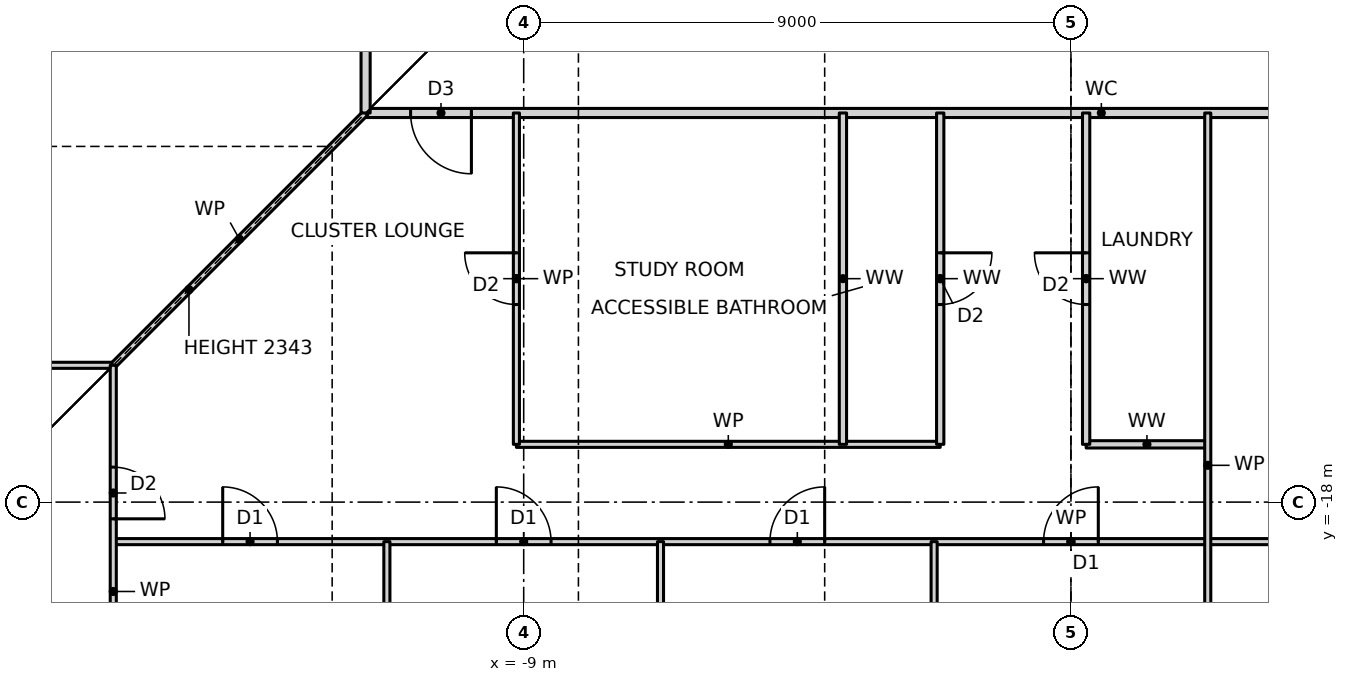
"""IFC4 building model, lengths in metres.
Left out: names, types, materials, properties, quantities, classifications, styles, units other than length and angle.
Written with IfcOpenShell. Run it as: python <this file> out.ifc"""

import sys

from ifc_helpers import new_model, si_unit, direction, frame, frame_2d, origin, place, context, subcontext, project, spatial, rectangle, extrude, element, fill, save


model = new_model("IFC4")
c1 = context("Model", 3, precision=1e-05, world=origin(), true_north=direction((0.0, 1.0)))
c2 = subcontext(c1, "Body", "Model", "MODEL_VIEW")
j1 = project(units=[si_unit("LENGTHUNIT", "METRE"), si_unit("PLANEANGLEUNIT", "RADIAN")], contexts=[c1])
p1 = place(None, origin())
s1 = spatial("IfcSite", under=j1, at=p1, CompositionType="ELEMENT")
p2 = place(p1, origin())
s2 = spatial("IfcBuilding", under=s1, at=p2, CompositionType="ELEMENT")
p3 = place(p2, frame((0.0, 0.0, 67.5)))
s3 = spatial("IfcBuildingStorey", under=s2, at=p3, CompositionType="ELEMENT", Elevation=67.5)
p4 = place(p3, frame((-15.75, -18.65, 0.0), z_axis=(0.0, 0.0, 1.0), x_axis=(1.0, 0.0, 0.0)))
e1 = element("IfcWall", 1, at=p4, inside=s3, PredefinedType="PARTITIONING", context=c2, shape_type="SweptSolid", body=[
    extrude(rectangle(XDim=31.5, YDim=0.1, at=frame_2d((15.75, 0.0))), origin(), (0.0, 0.0, 1.0), 3.27),
])
p5 = place(p4, frame((1.8, 0.0, 0.0)))
e2 = element("IfcOpeningElement", 2, at=p5, cuts=e1, PredefinedType="OPENING", context=c2, shape_type="SweptSolid", body=[
    extrude(rectangle(XDim=0.9, YDim=2.1, at=frame_2d((0.45, 1.05))), frame((0.0, 0.06, 0.0), z_axis=(0.0, -1.0, 0.0), x_axis=(1.0, 0.0, 0.0)), (0.0, 0.0, 1.0), 0.12),
])
p6 = place(p4, frame((6.3, 0.0, 0.0)))
e3 = element("IfcOpeningElement", 3, at=p6, cuts=e1, PredefinedType="OPENING", context=c2, shape_type="SweptSolid", body=[
    extrude(rectangle(XDim=0.9, YDim=2.1, at=frame_2d((0.45, 1.05))), frame((0.0, 0.06, 0.0), z_axis=(0.0, -1.0, 0.0), x_axis=(1.0, 0.0, 0.0)), (0.0, 0.0, 1.0), 0.12),
])
p7 = place(p4, frame((10.8, 0.0, 0.0)))
e4 = element("IfcOpeningElement", 4, at=p7, cuts=e1, PredefinedType="OPENING", context=c2, shape_type="SweptSolid", body=[
    extrude(rectangle(XDim=0.9, YDim=2.1, at=frame_2d((0.45, 1.05))), frame((0.0, 0.06, 0.0), z_axis=(0.0, -1.0, 0.0), x_axis=(1.0, 0.0, 0.0)), (0.0, 0.0, 1.0), 0.12),
])
p8 = place(p4, frame((15.3, 0.0, 0.0)))
e5 = element("IfcOpeningElement", 5, at=p8, cuts=e1, PredefinedType="OPENING", context=c2, shape_type="SweptSolid", body=[
    extrude(rectangle(XDim=0.9, YDim=2.1, at=frame_2d((0.45, 1.05))), frame((0.0, 0.06, 0.0), z_axis=(0.0, -1.0, 0.0), x_axis=(1.0, 0.0, 0.0)), (0.0, 0.0, 1.0), 0.12),
])
p9 = place(p4, frame((19.8, 0.0, 0.0)))
e6 = element("IfcOpeningElement", 6, at=p9, cuts=e1, PredefinedType="OPENING", context=c2, shape_type="SweptSolid", body=[
    extrude(rectangle(XDim=0.9, YDim=2.1, at=frame_2d((0.45, 1.05))), frame((0.0, 0.06, 0.0), z_axis=(0.0, -1.0, 0.0), x_axis=(1.0, 0.0, 0.0)), (0.0, 0.0, 1.0), 0.12),
])
p10 = place(p4, frame((24.3, 0.0, 0.0)))
e7 = element("IfcOpeningElement", 7, at=p10, cuts=e1, PredefinedType="OPENING", context=c2, shape_type="SweptSolid", body=[
    extrude(rectangle(XDim=0.9, YDim=2.1, at=frame_2d((0.45, 1.05))), frame((0.0, 0.06, 0.0), z_axis=(0.0, -1.0, 0.0), x_axis=(1.0, 0.0, 0.0)), (0.0, 0.0, 1.0), 0.12),
])
p11 = place(p4, frame((28.8, 0.0, 0.0)))
e8 = element("IfcOpeningElement", 8, at=p11, cuts=e1, PredefinedType="OPENING", context=c2, shape_type="SweptSolid", body=[
    extrude(rectangle(XDim=0.9, YDim=2.1, at=frame_2d((0.45, 1.05))), frame((0.0, 0.06, 0.0), z_axis=(0.0, -1.0, 0.0), x_axis=(1.0, 0.0, 0.0)), (0.0, 0.0, 1.0), 0.12),
])
p12 = place(p3, frame((-9.12, -17.05, 0.0), z_axis=(0.0, 0.0, 1.0), x_axis=(1.0, 0.0, 0.0)))
e9 = element("IfcWall", 9, at=p12, inside=s3, PredefinedType="PARTITIONING", context=c2, shape_type="SweptSolid", body=[
    extrude(rectangle(XDim=6.97, YDim=0.1, at=frame_2d((3.485, 0.0))), origin(), (0.0, 0.0, 1.0), 3.27),
])
p13 = place(p3, frame((0.25, -17.05, 0.0), z_axis=(0.0, 0.0, 1.0), x_axis=(1.0, 0.0, 0.0)))
e10 = element("IfcWall", 10, at=p13, inside=s3, PredefinedType="PARTITIONING", context=c2, shape_type="SweptSolid", body=[
    extrude(rectangle(XDim=2.0, YDim=0.12, at=frame_2d((1.0, 0.0))), origin(), (0.0, 0.0, 1.0), 3.27),
])
p14 = place(p3, frame((-23.19, -15.75, 0.0), z_axis=(0.0, 0.0, 1.0), x_axis=(1.0, 0.0, 0.0)))
e11 = element("IfcWall", 11, at=p14, inside=s3, PredefinedType="PARTITIONING", context=c2, shape_type="SweptSolid", body=[
    extrude(rectangle(XDim=7.44, YDim=0.1, at=frame_2d((3.72, 0.0))), origin(), (0.0, 0.0, 1.0), 3.27),
])
p15 = place(p3, frame((-11.6, -11.6, 0.0), z_axis=(0.0, 0.0, 1.0), x_axis=(1.0, 0.0, 0.0)))
e12 = element("IfcWall", 12, at=p15, inside=s3, PredefinedType="PARTITIONING", context=c2, shape_type="SweptSolid", body=[
    extrude(rectangle(XDim=24.2, YDim=0.15, at=frame_2d((12.1, 0.0))), origin(), (0.0, 0.0, 1.0), 3.27),
])
p16 = place(p15, frame((0.74, 0.0, 0.0)))
e13 = element("IfcOpeningElement", 13, at=p16, cuts=e12, PredefinedType="OPENING", context=c2, shape_type="SweptSolid", body=[
    extrude(rectangle(XDim=1.0, YDim=2.1, at=frame_2d((0.5, 1.05))), frame((0.0, 0.085, 0.0), z_axis=(0.0, -1.0, 0.0), x_axis=(1.0, 0.0, 0.0)), (0.0, 0.0, 1.0), 0.17),
])
p17 = place(p15, frame((21.025, 0.0, 0.0)))
e14 = element("IfcOpeningElement", 14, at=p17, cuts=e12, PredefinedType="OPENING", context=c2, shape_type="SweptSolid", body=[
    extrude(rectangle(XDim=1.0, YDim=2.1, at=frame_2d((0.5, 1.05))), frame((0.0, 0.085, 0.0), z_axis=(0.0, -1.0, 0.0), x_axis=(1.0, 0.0, 0.0)), (0.0, 0.0, 1.0), 0.17),
])
p18 = place(p3, frame((-15.75, -15.75, 0.0), z_axis=(0.0, 0.0, 1.0), x_axis=(0.707106781187, 0.707106781187, 0.0)))
e15 = element("IfcWall", 15, at=p18, inside=s3, PredefinedType="PARTITIONING", context=c2, shape_type="SweptSolid", body=[
    extrude(rectangle(XDim=5.869, YDim=0.1, at=frame_2d((2.935, 0.0))), origin(), (0.0, 0.0, 1.0), 2.343),
])
p19 = place(p3, frame((2.25, -23.19, 0.0), z_axis=(0.0, 0.0, 1.0), x_axis=(0.0, 1.0, 0.0)))
e16 = element("IfcWall", 16, at=p19, inside=s3, PredefinedType="PARTITIONING", context=c2, shape_type="SweptSolid", body=[
    extrude(rectangle(XDim=11.59, YDim=0.1, at=frame_2d((5.795, 0.0))), origin(), (0.0, 0.0, 1.0), 3.27),
])
p20 = place(p3, frame((0.25, -17.05, 0.0), z_axis=(0.0, 0.0, 1.0), x_axis=(0.0, 1.0, 0.0)))
e17 = element("IfcWall", 17, at=p20, inside=s3, PredefinedType="PARTITIONING", context=c2, shape_type="SweptSolid", body=[
    extrude(rectangle(XDim=5.45, YDim=0.12, at=frame_2d((2.725, 0.0))), origin(), (0.0, 0.0, 1.0), 3.27),
])
p21 = place(p20, frame((2.3, 0.0, 0.0)))
e18 = element("IfcOpeningElement", 18, at=p21, cuts=e17, PredefinedType="OPENING", context=c2, shape_type="SweptSolid", body=[
    extrude(rectangle(XDim=0.85, YDim=2.1, at=frame_2d((0.425, 1.05))), frame((0.0, 0.07, 0.0), z_axis=(0.0, -1.0, 0.0), x_axis=(1.0, 0.0, 0.0)), (0.0, 0.0, 1.0), 0.14),
])
p22 = place(p3, frame((-2.15, -17.05, 0.0), z_axis=(0.0, 0.0, 1.0), x_axis=(0.0, 1.0, 0.0)))
e19 = element("IfcWall", 19, at=p22, inside=s3, PredefinedType="PARTITIONING", context=c2, shape_type="SweptSolid", body=[
    extrude(rectangle(XDim=5.45, YDim=0.12, at=frame_2d((2.725, 0.0))), origin(), (0.0, 0.0, 1.0), 3.27),
])
p23 = place(p22, frame((2.3, 0.0, 0.0)))
e20 = element("IfcOpeningElement", 20, at=p23, cuts=e19, PredefinedType="OPENING", context=c2, shape_type="SweptSolid", body=[
    extrude(rectangle(XDim=0.85, YDim=2.1, at=frame_2d((0.425, 1.05))), frame((0.0, 0.07, 0.0), z_axis=(0.0, -1.0, 0.0), x_axis=(1.0, 0.0, 0.0)), (0.0, 0.0, 1.0), 0.14),
])
p24 = place(p3, frame((-2.25, -23.19, 0.0), z_axis=(0.0, 0.0, 1.0), x_axis=(0.0, 1.0, 0.0)))
e21 = element("IfcWall", 21, at=p24, inside=s3, PredefinedType="PARTITIONING", context=c2, shape_type="SweptSolid", body=[
    extrude(rectangle(XDim=4.54, YDim=0.1, at=frame_2d((2.27, 0.0))), origin(), (0.0, 0.0, 1.0), 3.27),
])
p25 = place(p3, frame((-3.75, -17.05, 0.0), z_axis=(0.0, 0.0, 1.0), x_axis=(0.0, 1.0, 0.0)))
e22 = element("IfcWall", 22, at=p25, inside=s3, PredefinedType="PARTITIONING", context=c2, shape_type="SweptSolid", body=[
    extrude(rectangle(XDim=5.45, YDim=0.12, at=frame_2d((2.725, 0.0))), origin(), (0.0, 0.0, 1.0), 3.27),
])
p26 = place(p3, frame((-6.75, -23.19, 0.0), z_axis=(0.0, 0.0, 1.0), x_axis=(0.0, 1.0, 0.0)))
e23 = element("IfcWall", 23, at=p26, inside=s3, PredefinedType="PARTITIONING", context=c2, shape_type="SweptSolid", body=[
    extrude(rectangle(XDim=4.54, YDim=0.1, at=frame_2d((2.27, 0.0))), origin(), (0.0, 0.0, 1.0), 3.27),
])
p27 = place(p3, frame((-9.12, -17.05, 0.0), z_axis=(0.0, 0.0, 1.0), x_axis=(0.0, 1.0, 0.0)))
e24 = element("IfcWall", 24, at=p27, inside=s3, PredefinedType="PARTITIONING", context=c2, shape_type="SweptSolid", body=[
    extrude(rectangle(XDim=5.45, YDim=0.1, at=frame_2d((2.725, 0.0))), origin(), (0.0, 0.0, 1.0), 3.27),
])
p28 = place(p27, frame((2.3, 0.0, 0.0)))
e25 = element("IfcOpeningElement", 25, at=p28, cuts=e24, PredefinedType="OPENING", context=c2, shape_type="SweptSolid", body=[
    extrude(rectangle(XDim=0.85, YDim=2.1, at=frame_2d((0.425, 1.05))), frame((0.0, 0.06, 0.0), z_axis=(0.0, -1.0, 0.0), x_axis=(1.0, 0.0, 0.0)), (0.0, 0.0, 1.0), 0.12),
])
p29 = place(p3, frame((-11.25, -23.19, 0.0), z_axis=(0.0, 0.0, 1.0), x_axis=(0.0, 1.0, 0.0)))
e26 = element("IfcWall", 26, at=p29, inside=s3, PredefinedType="PARTITIONING", context=c2, shape_type="SweptSolid", body=[
    extrude(rectangle(XDim=4.54, YDim=0.1, at=frame_2d((2.27, 0.0))), origin(), (0.0, 0.0, 1.0), 3.27),
])
p30 = place(p3, frame((-11.6, -11.6, 0.0), z_axis=(0.0, 0.0, 1.0), x_axis=(0.0, 1.0, 0.0)))
e27 = element("IfcWall", 27, at=p30, inside=s3, PredefinedType="PARTITIONING", context=c2, shape_type="SweptSolid", body=[
    extrude(rectangle(XDim=23.2, YDim=0.15, at=frame_2d((11.6, 0.0))), origin(), (0.0, 0.0, 1.0), 3.27),
])
p31 = place(p30, frame((18.6, 0.0, 0.0)))
e28 = element("IfcOpeningElement", 28, at=p31, cuts=e27, PredefinedType="OPENING", context=c2, shape_type="SweptSolid", body=[
    extrude(rectangle(XDim=1.0, YDim=2.1, at=frame_2d((0.5, 1.05))), frame((0.0, 0.085, 0.0), z_axis=(0.0, -1.0, 0.0), x_axis=(1.0, 0.0, 0.0)), (0.0, 0.0, 1.0), 0.17),
])
p32 = place(p30, frame((1.175, 0.0, 0.0)))
e29 = element("IfcOpeningElement", 29, at=p32, cuts=e27, PredefinedType="OPENING", context=c2, shape_type="SweptSolid", body=[
    extrude(rectangle(XDim=1.0, YDim=2.1, at=frame_2d((0.5, 1.05))), frame((0.0, 0.085, 0.0), z_axis=(0.0, -1.0, 0.0), x_axis=(1.0, 0.0, 0.0)), (0.0, 0.0, 1.0), 0.17),
])
p33 = place(p3, frame((-15.75, -23.19, 0.0), z_axis=(0.0, 0.0, 1.0), x_axis=(0.0, 1.0, 0.0)))
e30 = element("IfcWall", 30, at=p33, inside=s3, PredefinedType="PARTITIONING", context=c2, shape_type="SweptSolid", body=[
    extrude(rectangle(XDim=7.44, YDim=0.1, at=frame_2d((3.72, 0.0))), origin(), (0.0, 0.0, 1.0), 3.27),
])
p34 = place(p33, frame((4.915, 0.0, 0.0)))
e31 = element("IfcOpeningElement", 31, at=p34, cuts=e30, PredefinedType="OPENING", context=c2, shape_type="SweptSolid", body=[
    extrude(rectangle(XDim=0.85, YDim=2.1, at=frame_2d((0.425, 1.05))), frame((0.0, 0.06, 0.0), z_axis=(0.0, -1.0, 0.0), x_axis=(1.0, 0.0, 0.0)), (0.0, 0.0, 1.0), 0.12),
])
p35 = place(p5, origin())
e32 = element("IfcDoor", 32, at=p35, inside=s3, OperationType="SINGLE_SWING_LEFT", PredefinedType="DOOR", context=c2, shape_type="SweptSolid", body=[
    extrude(rectangle(XDim=0.9, YDim=2.1, at=frame_2d((0.45, 1.05))), frame((0.0, 0.025, 0.0), z_axis=(0.0, -1.0, 0.0), x_axis=(1.0, 0.0, 0.0)), (0.0, 0.0, 1.0), 0.05),
])
fill(e2, e32)
p36 = place(p6, origin())
e33 = element("IfcDoor", 33, at=p36, inside=s3, OperationType="SINGLE_SWING_LEFT", PredefinedType="DOOR", context=c2, shape_type="SweptSolid", body=[
    extrude(rectangle(XDim=0.9, YDim=2.1, at=frame_2d((0.45, 1.05))), frame((0.0, 0.025, 0.0), z_axis=(0.0, -1.0, 0.0), x_axis=(1.0, 0.0, 0.0)), (0.0, 0.0, 1.0), 0.05),
])
fill(e3, e33)
p37 = place(p7, origin())
e34 = element("IfcDoor", 34, at=p37, inside=s3, OperationType="SINGLE_SWING_RIGHT", PredefinedType="DOOR", context=c2, shape_type="SweptSolid", body=[
    extrude(rectangle(XDim=0.9, YDim=2.1, at=frame_2d((0.45, 1.05))), frame((0.0, 0.025, 0.0), z_axis=(0.0, -1.0, 0.0), x_axis=(1.0, 0.0, 0.0)), (0.0, 0.0, 1.0), 0.05),
])
fill(e4, e34)
p38 = place(p8, origin())
e35 = element("IfcDoor", 35, at=p38, inside=s3, OperationType="SINGLE_SWING_RIGHT", PredefinedType="DOOR", context=c2, shape_type="SweptSolid", body=[
    extrude(rectangle(XDim=0.9, YDim=2.1, at=frame_2d((0.45, 1.05))), frame((0.0, 0.025, 0.0), z_axis=(0.0, -1.0, 0.0), x_axis=(1.0, 0.0, 0.0)), (0.0, 0.0, 1.0), 0.05),
])
fill(e5, e35)
p39 = place(p16, frame((1.0, 0.0, 0.0), z_axis=(0.0, 0.0, 1.0), x_axis=(-1.0, 0.0, 0.0)))
e36 = element("IfcDoor", 36, at=p39, inside=s3, OperationType="SINGLE_SWING_LEFT", PredefinedType="DOOR", context=c2, shape_type="SweptSolid", body=[
    extrude(rectangle(XDim=1.0, YDim=2.1, at=frame_2d((0.5, 1.05))), frame((0.0, 0.025, 0.0), z_axis=(0.0, -1.0, 0.0), x_axis=(1.0, 0.0, 0.0)), (0.0, 0.0, 1.0), 0.05),
])
fill(e13, e36)
p40 = place(p28, origin())
e37 = element("IfcDoor", 37, at=p40, inside=s3, OperationType="SINGLE_SWING_RIGHT", PredefinedType="DOOR", context=c2, shape_type="SweptSolid", body=[
    extrude(rectangle(XDim=0.85, YDim=2.1, at=frame_2d((0.425, 1.05))), frame((0.0, 0.025, 0.0), z_axis=(0.0, -1.0, 0.0), x_axis=(1.0, 0.0, 0.0)), (0.0, 0.0, 1.0), 0.05),
])
fill(e25, e37)
p41 = place(p23, frame((0.85, 0.0, 0.0), z_axis=(0.0, 0.0, 1.0), x_axis=(-1.0, 0.0, 0.0)))
e38 = element("IfcDoor", 38, at=p41, inside=s3, OperationType="SINGLE_SWING_LEFT", PredefinedType="DOOR", context=c2, shape_type="SweptSolid", body=[
    extrude(rectangle(XDim=0.85, YDim=2.1, at=frame_2d((0.425, 1.05))), frame((0.0, 0.025, 0.0), z_axis=(0.0, -1.0, 0.0), x_axis=(1.0, 0.0, 0.0)), (0.0, 0.0, 1.0), 0.05),
])
fill(e20, e38)
p42 = place(p21, origin())
e39 = element("IfcDoor", 39, at=p42, inside=s3, OperationType="SINGLE_SWING_RIGHT", PredefinedType="DOOR", context=c2, shape_type="SweptSolid", body=[
    extrude(rectangle(XDim=0.85, YDim=2.1, at=frame_2d((0.425, 1.05))), frame((0.0, 0.025, 0.0), z_axis=(0.0, -1.0, 0.0), x_axis=(1.0, 0.0, 0.0)), (0.0, 0.0, 1.0), 0.05),
])
fill(e18, e39)
p43 = place(p34, frame((0.85, 0.0, 0.0), z_axis=(0.0, 0.0, 1.0), x_axis=(-1.0, 0.0, 0.0)))
e40 = element("IfcDoor", 40, at=p43, inside=s3, OperationType="SINGLE_SWING_RIGHT", PredefinedType="DOOR", context=c2, shape_type="SweptSolid", body=[
    extrude(rectangle(XDim=0.85, YDim=2.1, at=frame_2d((0.425, 1.05))), frame((0.0, 0.025, 0.0), z_axis=(0.0, -1.0, 0.0), x_axis=(1.0, 0.0, 0.0)), (0.0, 0.0, 1.0), 0.05),
])
fill(e31, e40)
save(model, sys.argv[1])
